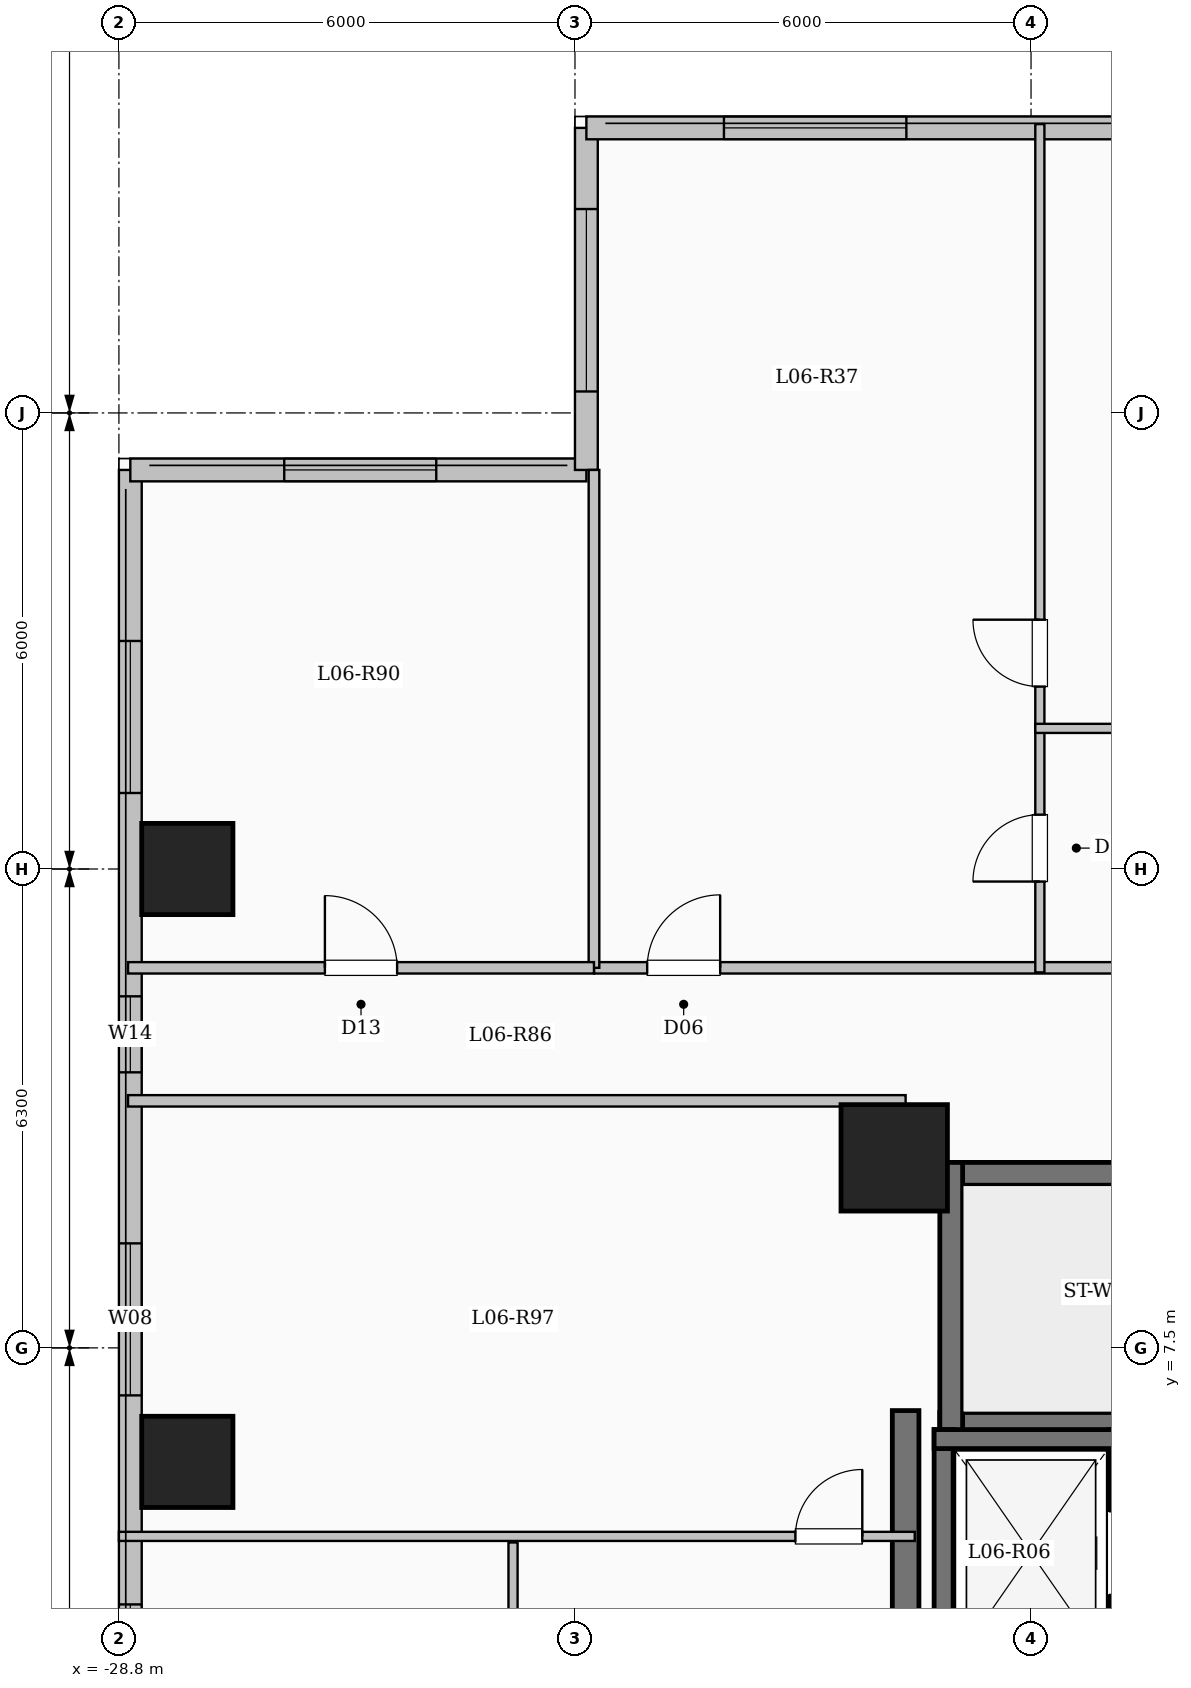
"""IFC4 building model, lengths in metres.
Left out: names, types, materials, properties, quantities, classifications, styles, units other than length and angle.
Written with IfcOpenShell. Run it as: python <this file> out.ifc"""

import sys

from ifc_helpers import new_model, si_unit, direction, frame, frame_2d, origin, origin_2d, place, context, subcontext, project, spatial, rectangle, extrude, element, fill, save


model = new_model("IFC4")
c1 = context("Model", 3, precision=1e-05, world=origin(), true_north=direction((0.0, 1.0)))
c2 = subcontext(c1, "Body", "Model", "MODEL_VIEW")
j1 = project(units=[si_unit("LENGTHUNIT", "METRE"), si_unit("PLANEANGLEUNIT", "RADIAN")], contexts=[c1])
p1 = place(None, origin())
s1 = spatial("IfcSite", under=j1, at=p1, CompositionType="ELEMENT")
p2 = place(p1, origin())
s2 = spatial("IfcBuilding", under=s1, at=p2, CompositionType="ELEMENT")
p3 = place(p2, frame((0.0, 0.0, 27.35)))
s3 = spatial("IfcBuildingStorey", under=s2, at=p3, CompositionType="ELEMENT", Elevation=27.35)
p4 = place(p3, frame((-18.6, 10.0, 0.0), z_axis=(0.0, 0.0, 1.0), x_axis=(1.0, 0.0, 0.0)))
e1 = element("IfcColumn", 1, at=p4, inside=s3, PredefinedType="COLUMN", context=c2, shape_type="SweptSolid", body=[
    extrude(rectangle(XDim=1.4, YDim=1.4, at=origin_2d()), origin(), (0.0, 0.0, 1.0), 3.35),
])
for number, where, z_axis, x_axis in (
    (2, (-27.9, 6.0, 0.0), (0.0, 0.0, 1.0), (1.0, 0.0, 0.0)),
    (3, (-27.9, 13.8, 0.0), (0.0, 0.0, 1.0), (1.0, 0.0, 0.0)),
):
    element("IfcColumn", number, at=place(p3, frame(where, z_axis=z_axis, x_axis=x_axis)), inside=s3, PredefinedType="COLUMN", context=c2, shape_type="SweptSolid", body=[
        extrude(rectangle(XDim=1.2, YDim=1.2, at=origin_2d()), origin(), (0.0, 0.0, 1.0), 3.35),
    ])
p5 = place(p3, frame((-28.65, -19.05, 0.0), z_axis=(0.0, 0.0, 1.0), x_axis=(0.0, 1.0, 0.0)))
e4 = element("IfcWall", 4, at=p5, inside=s3, PredefinedType="SOLIDWALL", context=c2, shape_type="SweptSolid", body=[
    extrude(rectangle(XDim=38.1, YDim=0.3, at=frame_2d((19.05, 0.0))), origin(), (0.0, 0.0, 1.0), 3.1),
])
p6 = place(p5, frame((3.15, 0.0, 0.9)))
e5 = element("IfcOpeningElement", 5, at=p6, cuts=e4, PredefinedType="OPENING", context=c2, shape_type="SweptSolid", body=[
    extrude(rectangle(XDim=2.4, YDim=1.8, at=frame_2d((1.2, 0.9))), frame((0.0, 0.16, 0.0), z_axis=(0.0, -1.0, 0.0), x_axis=(1.0, 0.0, 0.0)), (0.0, 0.0, 1.0), 0.32),
])
p7 = place(p5, frame((9.542, 0.0, 0.9)))
e6 = element("IfcOpeningElement", 6, at=p7, cuts=e4, PredefinedType="OPENING", context=c2, shape_type="SweptSolid", body=[
    extrude(rectangle(XDim=1.5, YDim=1.65, at=frame_2d((0.75, 0.825))), frame((0.0, 0.16, 0.0), z_axis=(0.0, -1.0, 0.0), x_axis=(1.0, 0.0, 0.0)), (0.0, 0.0, 1.0), 0.32),
])
p8 = place(p5, frame((14.95, 0.0, 0.9)))
e7 = element("IfcOpeningElement", 7, at=p8, cuts=e4, PredefinedType="OPENING", context=c2, shape_type="SweptSolid", body=[
    extrude(rectangle(XDim=2.4, YDim=1.8, at=frame_2d((1.2, 0.9))), frame((0.0, 0.16, 0.0), z_axis=(0.0, -1.0, 0.0), x_axis=(1.0, 0.0, 0.0)), (0.0, 0.0, 1.0), 0.32),
])
p9 = place(p5, frame((21.375, 0.0, 0.9)))
e8 = element("IfcOpeningElement", 8, at=p9, cuts=e4, PredefinedType="OPENING", context=c2, shape_type="SweptSolid", body=[
    extrude(rectangle(XDim=1.8, YDim=1.65, at=frame_2d((0.9, 0.825))), frame((0.0, 0.16, 0.0), z_axis=(0.0, -1.0, 0.0), x_axis=(1.0, 0.0, 0.0)), (0.0, 0.0, 1.0), 0.32),
])
p10 = place(p5, frame((25.925, 0.0, 0.9)))
e9 = element("IfcOpeningElement", 9, at=p10, cuts=e4, PredefinedType="OPENING", context=c2, shape_type="SweptSolid", body=[
    extrude(rectangle(XDim=2.0, YDim=1.7, at=frame_2d((1.0, 0.85))), frame((0.0, 0.16, 0.0), z_axis=(0.0, -1.0, 0.0), x_axis=(1.0, 0.0, 0.0)), (0.0, 0.0, 1.0), 0.32),
])
p11 = place(p5, frame((30.175, 0.0, 0.95)))
e10 = element("IfcOpeningElement", 10, at=p11, cuts=e4, PredefinedType="OPENING", context=c2, shape_type="SweptSolid", body=[
    extrude(rectangle(XDim=1.0, YDim=1.5, at=frame_2d((0.5, 0.75))), frame((0.0, 0.16, 0.0), z_axis=(0.0, -1.0, 0.0), x_axis=(1.0, 0.0, 0.0)), (0.0, 0.0, 1.0), 0.32),
])
p12 = place(p5, frame((33.85, 0.0, 0.9)))
e11 = element("IfcOpeningElement", 11, at=p12, cuts=e4, PredefinedType="OPENING", context=c2, shape_type="SweptSolid", body=[
    extrude(rectangle(XDim=2.0, YDim=1.7, at=frame_2d((1.0, 0.85))), frame((0.0, 0.16, 0.0), z_axis=(0.0, -1.0, 0.0), x_axis=(1.0, 0.0, 0.0)), (0.0, 0.0, 1.0), 0.32),
])
p13 = place(p3, frame((-28.65, 19.05, 0.0), z_axis=(0.0, 0.0, 1.0), x_axis=(1.0, 0.0, 0.0)))
e12 = element("IfcWall", 12, at=p13, inside=s3, PredefinedType="SOLIDWALL", context=c2, shape_type="SweptSolid", body=[
    extrude(rectangle(XDim=6.0, YDim=0.3, at=frame_2d((3.0, 0.0))), origin(), (0.0, 0.0, 1.0), 3.1),
])
p14 = place(p13, frame((2.025, 0.0, 0.9)))
e13 = element("IfcOpeningElement", 13, at=p14, cuts=e12, PredefinedType="OPENING", context=c2, shape_type="SweptSolid", body=[
    extrude(rectangle(XDim=2.0, YDim=1.7, at=frame_2d((1.0, 0.85))), frame((0.0, 0.16, 0.0), z_axis=(0.0, -1.0, 0.0), x_axis=(1.0, 0.0, 0.0)), (0.0, 0.0, 1.0), 0.32),
])
p15 = place(p3, frame((-22.65, 19.05, 0.0), z_axis=(0.0, 0.0, 1.0), x_axis=(0.0, 1.0, 0.0)))
e14 = element("IfcWall", 14, at=p15, inside=s3, PredefinedType="SOLIDWALL", context=c2, shape_type="SweptSolid", body=[
    extrude(rectangle(XDim=4.5, YDim=0.3, at=frame_2d((2.25, 0.0))), origin(), (0.0, 0.0, 1.0), 3.1),
])
p16 = place(p15, frame((1.032, 0.0, 0.9)))
e15 = element("IfcOpeningElement", 15, at=p16, cuts=e14, PredefinedType="OPENING", context=c2, shape_type="SweptSolid", body=[
    extrude(rectangle(XDim=2.4, YDim=1.8, at=frame_2d((1.2, 0.9))), frame((0.0, 0.16, 0.0), z_axis=(0.0, -1.0, 0.0), x_axis=(1.0, 0.0, 0.0)), (0.0, 0.0, 1.0), 0.32),
])
p17 = place(p3, frame((-22.65, 23.55, 0.0), z_axis=(0.0, 0.0, 1.0), x_axis=(1.0, 0.0, 0.0)))
e16 = element("IfcWall", 16, at=p17, inside=s3, PredefinedType="SOLIDWALL", context=c2, shape_type="SweptSolid", body=[
    extrude(rectangle(XDim=15.3, YDim=0.3, at=frame_2d((7.65, 0.0))), origin(), (0.0, 0.0, 1.0), 3.1),
])
p18 = place(p17, frame((1.81, 0.0, 0.9)))
e17 = element("IfcOpeningElement", 17, at=p18, cuts=e16, PredefinedType="OPENING", context=c2, shape_type="SweptSolid", body=[
    extrude(rectangle(XDim=2.4, YDim=1.8, at=frame_2d((1.2, 0.9))), frame((0.0, 0.16, 0.0), z_axis=(0.0, -1.0, 0.0), x_axis=(1.0, 0.0, 0.0)), (0.0, 0.0, 1.0), 0.32),
])
p19 = place(p17, frame((7.427, 0.0, 0.9)))
e18 = element("IfcOpeningElement", 18, at=p19, cuts=e16, PredefinedType="OPENING", context=c2, shape_type="SweptSolid", body=[
    extrude(rectangle(XDim=1.8, YDim=1.65, at=frame_2d((0.9, 0.825))), frame((0.0, 0.16, 0.0), z_axis=(0.0, -1.0, 0.0), x_axis=(1.0, 0.0, 0.0)), (0.0, 0.0, 1.0), 0.32),
])
p20 = place(p17, frame((11.868, 0.0, 0.9)))
e19 = element("IfcOpeningElement", 19, at=p20, cuts=e16, PredefinedType="OPENING", context=c2, shape_type="SweptSolid", body=[
    extrude(rectangle(XDim=2.4, YDim=1.8, at=frame_2d((1.2, 0.9))), frame((0.0, 0.16, 0.0), z_axis=(0.0, -1.0, 0.0), x_axis=(1.0, 0.0, 0.0)), (0.0, 0.0, 1.0), 0.32),
])
p21 = place(p3, frame((-18.0, 9.79, 0.0), z_axis=(0.0, 0.0, 1.0), x_axis=(1.0, 0.0, 0.0)))
e20 = element("IfcWall", 20, at=p21, inside=s3, PredefinedType="SHEAR", context=c2, shape_type="SweptSolid", body=[
    extrude(rectangle(XDim=8.0, YDim=0.3, at=frame_2d((4.0, 0.0))), origin(), (0.0, 0.0, 1.0), 3.35),
])
p22 = place(p3, frame((-18.0, 6.5, 0.0), z_axis=(0.0, 0.0, 1.0), x_axis=(1.0, 0.0, 0.0)))
e21 = element("IfcWall", 21, at=p22, inside=s3, PredefinedType="SHEAR", context=c2, shape_type="SweptSolid", body=[
    extrude(rectangle(XDim=8.0, YDim=0.3, at=frame_2d((4.0, 0.0))), origin(), (0.0, 0.0, 1.0), 3.35),
])
p23 = place(p22, frame((6.45, 0.0, 0.0)))
e22 = element("IfcOpeningElement", 22, at=p23, cuts=e21, PredefinedType="OPENING", context=c2, shape_type="SweptSolid", body=[
    extrude(rectangle(XDim=1.0, YDim=2.15, at=frame_2d((0.5, 1.075))), frame((0.0, 0.16, 0.0), z_axis=(0.0, -1.0, 0.0), x_axis=(1.0, 0.0, 0.0)), (0.0, 0.0, 1.0), 0.32),
])
p24 = place(p3, frame((-17.85, 6.35, 0.0), z_axis=(0.0, 0.0, 1.0), x_axis=(0.0, 1.0, 0.0)))
e23 = element("IfcWall", 23, at=p24, inside=s3, PredefinedType="SHEAR", context=c2, shape_type="SweptSolid", body=[
    extrude(rectangle(XDim=3.59, YDim=0.3, at=frame_2d((1.795, 0.0))), origin(), (0.0, 0.0, 1.0), 3.35),
])
p25 = place(p3, frame((-17.95, 3.175, 0.0), z_axis=(0.0, 0.0, 1.0), x_axis=(0.0, 1.0, 0.0)))
e24 = element("IfcWall", 24, at=p25, inside=s3, PredefinedType="SHEAR", context=c2, shape_type="SweptSolid", body=[
    extrude(rectangle(XDim=3.25, YDim=0.25, at=frame_2d((1.625, 0.0))), origin(), (0.0, 0.0, 1.0), 3.35),
])
p26 = place(p3, frame((-15.65, 3.175, 0.0), z_axis=(0.0, 0.0, 1.0), x_axis=(0.0, 1.0, 0.0)))
e25 = element("IfcWall", 25, at=p26, inside=s3, PredefinedType="SHEAR", context=c2, shape_type="SweptSolid", body=[
    extrude(rectangle(XDim=3.25, YDim=0.25, at=frame_2d((1.625, 0.0))), origin(), (0.0, 0.0, 1.0), 3.35),
])
p27 = place(p26, frame((1.075, 0.0, 0.0)))
e26 = element("IfcOpeningElement", 26, at=p27, cuts=e25, PredefinedType="OPENING", context=c2, shape_type="SweptSolid", body=[
    extrude(rectangle(XDim=1.1, YDim=2.15, at=frame_2d((0.55, 1.075))), frame((0.0, 0.135, 0.0), z_axis=(0.0, -1.0, 0.0), x_axis=(1.0, 0.0, 0.0)), (0.0, 0.0, 1.0), 0.27),
])
p28 = place(p3, frame((-18.075, 6.3, 0.0), z_axis=(0.0, 0.0, 1.0), x_axis=(1.0, 0.0, 0.0)))
e27 = element("IfcWall", 27, at=p28, inside=s3, PredefinedType="SHEAR", context=c2, shape_type="SweptSolid", body=[
    extrude(rectangle(XDim=2.55, YDim=0.25, at=frame_2d((1.275, 0.0))), origin(), (0.0, 0.0, 1.0), 3.35),
])
p29 = place(p3, frame((-18.45, -7.375, 0.0), z_axis=(0.0, 0.0, 1.0), x_axis=(0.0, 1.0, 0.0)))
e28 = element("IfcWall", 28, at=p29, inside=s3, PredefinedType="SHEAR", context=c2, shape_type="SweptSolid", body=[
    extrude(rectangle(XDim=14.05, YDim=0.35, at=frame_2d((7.025, 0.0))), origin(), (0.0, 0.0, 1.0), 3.35),
])
p30 = place(p3, frame((-22.55, 12.5, 0.0), z_axis=(0.0, 0.0, 1.0), x_axis=(1.0, 0.0, 0.0)))
e29 = element("IfcWall", 29, at=p30, inside=s3, PredefinedType="PARTITIONING", context=c2, shape_type="SweptSolid", body=[
    extrude(rectangle(XDim=18.7, YDim=0.15, at=frame_2d((9.35, 0.0))), origin(), (0.0, 0.0, 1.0), 3.1),
])
p31 = place(p30, frame((0.7, 0.0, 0.0)))
e30 = element("IfcOpeningElement", 30, at=p31, cuts=e29, PredefinedType="OPENING", context=c2, shape_type="SweptSolid", body=[
    extrude(rectangle(XDim=0.96, YDim=2.15, at=frame_2d((0.48, 1.075))), frame((0.0, 0.085, 0.0), z_axis=(0.0, -1.0, 0.0), x_axis=(1.0, 0.0, 0.0)), (0.0, 0.0, 1.0), 0.17),
])
p32 = place(p30, frame((11.326, 0.0, 0.0)))
e31 = element("IfcOpeningElement", 31, at=p32, cuts=e29, PredefinedType="OPENING", context=c2, shape_type="SweptSolid", body=[
    extrude(rectangle(XDim=0.96, YDim=2.15, at=frame_2d((0.48, 1.075))), frame((0.0, 0.085, 0.0), z_axis=(0.0, -1.0, 0.0), x_axis=(1.0, 0.0, 0.0)), (0.0, 0.0, 1.0), 0.17),
])
p33 = place(p3, frame((-16.684, 12.44, 0.0), z_axis=(0.0, 0.0, 1.0), x_axis=(0.0, 1.0, 0.0)))
e32 = element("IfcWall", 32, at=p33, inside=s3, PredefinedType="PARTITIONING", context=c2, shape_type="SweptSolid", body=[
    extrude(rectangle(XDim=3.21, YDim=0.12, at=frame_2d((1.605, 0.0))), origin(), (0.0, 0.0, 1.0), 3.1),
])
p34 = place(p33, frame((1.195, 0.0, 0.0)))
e33 = element("IfcOpeningElement", 33, at=p34, cuts=e32, PredefinedType="OPENING", context=c2, shape_type="SweptSolid", body=[
    extrude(rectangle(XDim=0.88, YDim=2.1, at=frame_2d((0.44, 1.05))), frame((0.0, 0.07, 0.0), z_axis=(0.0, -1.0, 0.0), x_axis=(1.0, 0.0, 0.0)), (0.0, 0.0, 1.0), 0.14),
])
p35 = place(p3, frame((-16.684, 15.65, 0.0), z_axis=(0.0, 0.0, 1.0), x_axis=(0.0, 1.0, 0.0)))
e34 = element("IfcWall", 34, at=p35, inside=s3, PredefinedType="PARTITIONING", context=c2, shape_type="SweptSolid", body=[
    extrude(rectangle(XDim=7.95, YDim=0.12, at=frame_2d((3.975, 0.0))), origin(), (0.0, 0.0, 1.0), 3.1),
])
p36 = place(p35, frame((0.55, 0.0, 0.0)))
e35 = element("IfcOpeningElement", 35, at=p36, cuts=e34, PredefinedType="OPENING", context=c2, shape_type="SweptSolid", body=[
    extrude(rectangle(XDim=0.88, YDim=2.1, at=frame_2d((0.44, 1.05))), frame((0.0, 0.07, 0.0), z_axis=(0.0, -1.0, 0.0), x_axis=(1.0, 0.0, 0.0)), (0.0, 0.0, 1.0), 0.14),
])
p37 = place(p3, frame((-16.744, 15.65, 0.0), z_axis=(0.0, 0.0, 1.0), x_axis=(1.0, 0.0, 0.0)))
e36 = element("IfcWall", 36, at=p37, inside=s3, PredefinedType="PARTITIONING", context=c2, shape_type="SweptSolid", body=[
    extrude(rectangle(XDim=4.88, YDim=0.12, at=frame_2d((2.44, 0.0))), origin(), (0.0, 0.0, 1.0), 3.1),
])
p38 = place(p3, frame((-28.68, 10.75, 0.0), z_axis=(0.0, 0.0, 1.0), x_axis=(1.0, 0.0, 0.0)))
e37 = element("IfcWall", 37, at=p38, inside=s3, PredefinedType="PARTITIONING", context=c2, shape_type="SweptSolid", body=[
    extrude(rectangle(XDim=10.23, YDim=0.15, at=frame_2d((5.115, 0.0))), origin(), (0.0, 0.0, 1.0), 3.1),
])
p39 = place(p3, frame((-22.55, 12.5, 0.0), z_axis=(0.0, 0.0, 1.0), x_axis=(0.0, 1.0, 0.0)))
e38 = element("IfcWall", 38, at=p39, inside=s3, PredefinedType="PARTITIONING", context=c2, shape_type="SweptSolid", body=[
    extrude(rectangle(XDim=6.55, YDim=0.14, at=frame_2d((3.275, 0.0))), origin(), (0.0, 0.0, 1.0), 3.1),
])
p40 = place(p3, frame((-28.68, 12.5, 0.0), z_axis=(0.0, 0.0, 1.0), x_axis=(1.0, 0.0, 0.0)))
e39 = element("IfcWall", 39, at=p40, inside=s3, PredefinedType="PARTITIONING", context=c2, shape_type="SweptSolid", body=[
    extrude(rectangle(XDim=6.13, YDim=0.15, at=frame_2d((3.065, 0.0))), origin(), (0.0, 0.0, 1.0), 3.1),
])
p41 = place(p40, frame((2.59, 0.0, 0.0)))
e40 = element("IfcOpeningElement", 40, at=p41, cuts=e39, PredefinedType="OPENING", context=c2, shape_type="SweptSolid", body=[
    extrude(rectangle(XDim=0.95, YDim=2.15, at=frame_2d((0.475, 1.075))), frame((0.0, 0.085, 0.0), z_axis=(0.0, -1.0, 0.0), x_axis=(1.0, 0.0, 0.0)), (0.0, 0.0, 1.0), 0.17),
])
p42 = place(p3, frame((-28.8, 5.02, 0.0), z_axis=(0.0, 0.0, 1.0), x_axis=(1.0, 0.0, 0.0)))
e41 = element("IfcWall", 41, at=p42, inside=s3, PredefinedType="PARTITIONING", context=c2, shape_type="SweptSolid", body=[
    extrude(rectangle(XDim=10.47, YDim=0.12, at=frame_2d((5.235, 0.0))), origin(), (0.0, 0.0, 1.0), 3.1),
])
p43 = place(p42, frame((8.9, 0.0, 0.0)))
e42 = element("IfcOpeningElement", 42, at=p43, cuts=e41, PredefinedType="OPENING", context=c2, shape_type="SweptSolid", body=[
    extrude(rectangle(XDim=0.88, YDim=2.1, at=frame_2d((0.44, 1.05))), frame((0.0, 0.07, 0.0), z_axis=(0.0, -1.0, 0.0), x_axis=(1.0, 0.0, 0.0)), (0.0, 0.0, 1.0), 0.14),
])
p44 = place(p3, frame((-23.615, 1.36, 0.0), z_axis=(0.0, 0.0, 1.0), x_axis=(0.0, 1.0, 0.0)))
e43 = element("IfcWall", 43, at=p44, inside=s3, PredefinedType="PARTITIONING", context=c2, shape_type="SweptSolid", body=[
    extrude(rectangle(XDim=3.58, YDim=0.12, at=frame_2d((1.79, 0.0))), origin(), (0.0, 0.0, 1.0), 3.1),
])
p45 = place(p9, origin())
e44 = element("IfcWindow", 44, at=p45, inside=s3, PartitioningType="SINGLE_PANEL", PredefinedType="WINDOW", context=c2, shape_type="SweptSolid", body=[
    extrude(rectangle(XDim=1.8, YDim=1.65, at=frame_2d((0.9, 0.825))), frame((0.0, 0.03, 0.0), z_axis=(0.0, -1.0, 0.0), x_axis=(1.0, 0.0, 0.0)), (0.0, 0.0, 1.0), 0.06),
])
fill(e8, e44)
p46 = place(p10, origin())
e45 = element("IfcWindow", 45, at=p46, inside=s3, PartitioningType="SINGLE_PANEL", PredefinedType="WINDOW", context=c2, shape_type="SweptSolid", body=[
    extrude(rectangle(XDim=2.0, YDim=1.7, at=frame_2d((1.0, 0.85))), frame((0.0, 0.03, 0.0), z_axis=(0.0, -1.0, 0.0), x_axis=(1.0, 0.0, 0.0)), (0.0, 0.0, 1.0), 0.06),
])
fill(e9, e45)
p47 = place(p11, origin())
e46 = element("IfcWindow", 46, at=p47, inside=s3, PartitioningType="SINGLE_PANEL", PredefinedType="WINDOW", context=c2, shape_type="SweptSolid", body=[
    extrude(rectangle(XDim=1.0, YDim=1.5, at=frame_2d((0.5, 0.75))), frame((0.0, 0.03, 0.0), z_axis=(0.0, -1.0, 0.0), x_axis=(1.0, 0.0, 0.0)), (0.0, 0.0, 1.0), 0.06),
])
fill(e10, e46)
p48 = place(p12, origin())
e47 = element("IfcWindow", 47, at=p48, inside=s3, PartitioningType="SINGLE_PANEL", PredefinedType="WINDOW", context=c2, shape_type="SweptSolid", body=[
    extrude(rectangle(XDim=2.0, YDim=1.7, at=frame_2d((1.0, 0.85))), frame((0.0, 0.03, 0.0), z_axis=(0.0, -1.0, 0.0), x_axis=(1.0, 0.0, 0.0)), (0.0, 0.0, 1.0), 0.06),
])
fill(e11, e47)
p49 = place(p14, origin())
e48 = element("IfcWindow", 48, at=p49, inside=s3, PartitioningType="SINGLE_PANEL", PredefinedType="WINDOW", context=c2, shape_type="SweptSolid", body=[
    extrude(rectangle(XDim=2.0, YDim=1.7, at=frame_2d((1.0, 0.85))), frame((0.0, 0.03, 0.0), z_axis=(0.0, -1.0, 0.0), x_axis=(1.0, 0.0, 0.0)), (0.0, 0.0, 1.0), 0.06),
])
fill(e13, e48)
p50 = place(p16, origin())
e49 = element("IfcWindow", 49, at=p50, inside=s3, PartitioningType="SINGLE_PANEL", PredefinedType="WINDOW", context=c2, shape_type="SweptSolid", body=[
    extrude(rectangle(XDim=2.4, YDim=1.8, at=frame_2d((1.2, 0.9))), frame((0.0, 0.03, 0.0), z_axis=(0.0, -1.0, 0.0), x_axis=(1.0, 0.0, 0.0)), (0.0, 0.0, 1.0), 0.06),
])
fill(e15, e49)
p51 = place(p18, origin())
e50 = element("IfcWindow", 50, at=p51, inside=s3, PartitioningType="SINGLE_PANEL", PredefinedType="WINDOW", context=c2, shape_type="SweptSolid", body=[
    extrude(rectangle(XDim=2.4, YDim=1.8, at=frame_2d((1.2, 0.9))), frame((0.0, 0.03, 0.0), z_axis=(0.0, -1.0, 0.0), x_axis=(1.0, 0.0, 0.0)), (0.0, 0.0, 1.0), 0.06),
])
fill(e17, e50)
p52 = place(p31, origin())
e51 = element("IfcDoor", 51, at=p52, inside=s3, OperationType="SINGLE_SWING_RIGHT", PredefinedType="DOOR", context=c2, shape_type="SweptSolid", body=[
    extrude(rectangle(XDim=0.96, YDim=2.15, at=frame_2d((0.48, 1.075))), frame((0.0, 0.025, 0.0), z_axis=(0.0, -1.0, 0.0), x_axis=(1.0, 0.0, 0.0)), (0.0, 0.0, 1.0), 0.05),
])
fill(e30, e51)
p53 = place(p34, origin())
e52 = element("IfcDoor", 52, at=p53, inside=s3, OperationType="SINGLE_SWING_LEFT", PredefinedType="DOOR", context=c2, shape_type="SweptSolid", body=[
    extrude(rectangle(XDim=0.88, YDim=2.1, at=frame_2d((0.44, 1.05))), frame((0.0, 0.025, 0.0), z_axis=(0.0, -1.0, 0.0), x_axis=(1.0, 0.0, 0.0)), (0.0, 0.0, 1.0), 0.05),
])
fill(e33, e52)
p54 = place(p36, origin())
e53 = element("IfcDoor", 53, at=p54, inside=s3, OperationType="SINGLE_SWING_RIGHT", PredefinedType="DOOR", context=c2, shape_type="SweptSolid", body=[
    extrude(rectangle(XDim=0.88, YDim=2.1, at=frame_2d((0.44, 1.05))), frame((0.0, 0.025, 0.0), z_axis=(0.0, -1.0, 0.0), x_axis=(1.0, 0.0, 0.0)), (0.0, 0.0, 1.0), 0.05),
])
fill(e35, e53)
p55 = place(p41, origin())
e54 = element("IfcDoor", 54, at=p55, inside=s3, OperationType="SINGLE_SWING_LEFT", PredefinedType="DOOR", context=c2, shape_type="SweptSolid", body=[
    extrude(rectangle(XDim=0.95, YDim=2.15, at=frame_2d((0.475, 1.075))), frame((0.0, 0.025, 0.0), z_axis=(0.0, -1.0, 0.0), x_axis=(1.0, 0.0, 0.0)), (0.0, 0.0, 1.0), 0.05),
])
fill(e40, e54)
p56 = place(p43, origin())
e55 = element("IfcDoor", 55, at=p56, inside=s3, OperationType="SINGLE_SWING_RIGHT", PredefinedType="DOOR", context=c2, shape_type="SweptSolid", body=[
    extrude(rectangle(XDim=0.88, YDim=2.1, at=frame_2d((0.44, 1.05))), frame((0.0, 0.025, 0.0), z_axis=(0.0, -1.0, 0.0), x_axis=(1.0, 0.0, 0.0)), (0.0, 0.0, 1.0), 0.05),
])
fill(e42, e55)
save(model, sys.argv[1])
